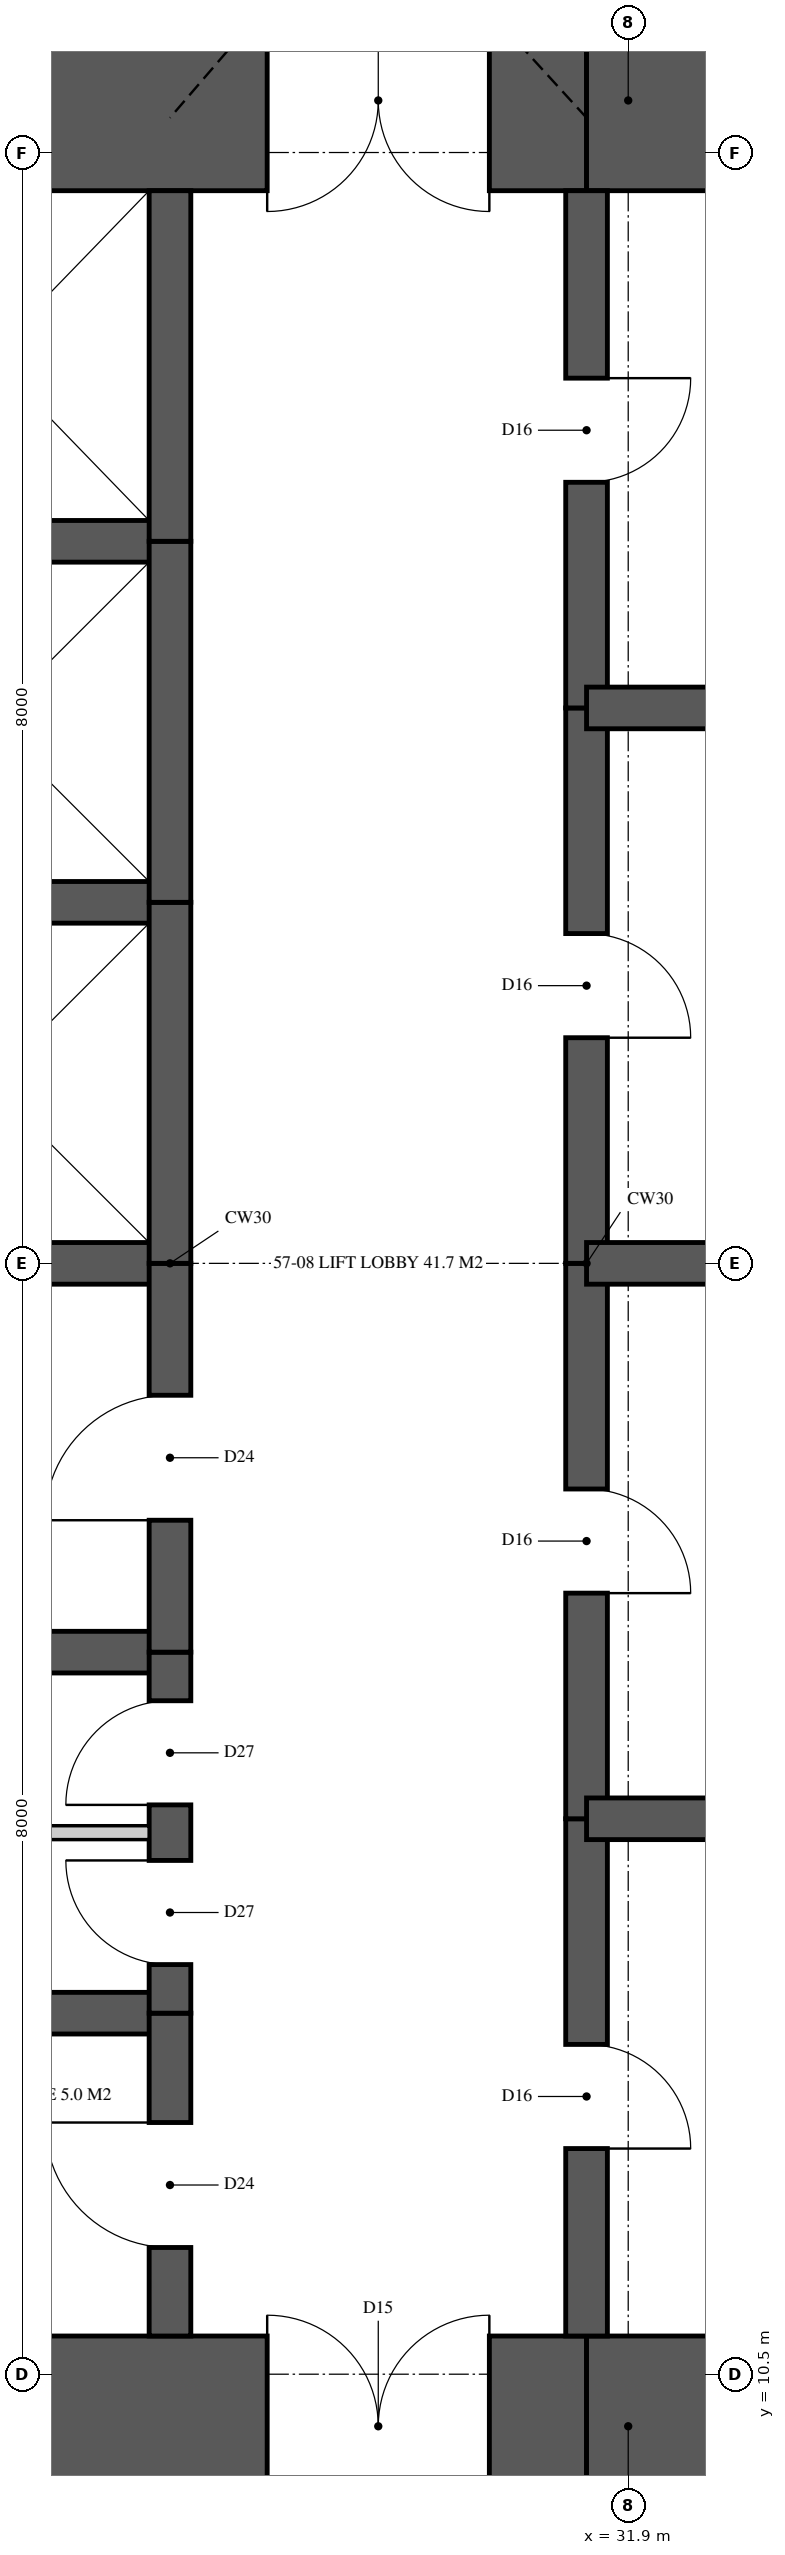
"""IFC4 building model, lengths in metres.
Left out: names, types, materials, properties, quantities, classifications, styles, units other than length and angle.
Written with IfcOpenShell. Run it as: python <this file> out.ifc"""

import sys

from ifc_helpers import new_model, si_unit, direction, frame, frame_2d, origin, place, context, subcontext, project, spatial, rectangle, extrude, element, fill, save


model = new_model("IFC4")
c1 = context("Model", 3, precision=1e-05, world=origin(), true_north=direction((0.0, 1.0)))
c2 = subcontext(c1, "Body", "Model", "MODEL_VIEW")
j1 = project(units=[si_unit("LENGTHUNIT", "METRE"), si_unit("PLANEANGLEUNIT", "RADIAN")], contexts=[c1])
p1 = place(None, origin())
s1 = spatial("IfcSite", under=j1, at=p1, CompositionType="ELEMENT")
p2 = place(p1, origin())
s2 = spatial("IfcBuilding", under=s1, at=p2, CompositionType="ELEMENT")
p3 = place(p2, frame((0.0, 0.0, 207.95)))
s3 = spatial("IfcBuildingStorey", under=s2, at=p3, CompositionType="ELEMENT", Elevation=207.95)
p4 = place(p3, frame((26.0, 10.125, 0.0), z_axis=(0.0, 0.0, 1.0), x_axis=(1.0, 0.0, 0.0)))
e1 = element("IfcWall", 1, at=p4, inside=s3, PredefinedType="SHEAR", context=c2, shape_type="SweptSolid", body=[
    extrude(rectangle(XDim=5.6, YDim=1.3, at=frame_2d((2.8, 0.0))), origin(), (0.0, 0.0, 1.0), 5.0),
])
p5 = place(p4, frame((3.3, 0.0, 0.0)))
e2 = element("IfcOpeningElement", 2, at=p5, cuts=e1, PredefinedType="OPENING", context=c2, shape_type="SweptSolid", body=[
    extrude(rectangle(XDim=1.6, YDim=2.1, at=frame_2d((0.8, 1.05))), frame((0.0, 0.66, 0.0), z_axis=(0.0, -1.0, 0.0), x_axis=(1.0, 0.0, 0.0)), (0.0, 0.0, 1.0), 1.32),
])
for number, where, z_axis, x_axis in (
    (3, (31.6, 10.125, 0.0), (0.0, 0.0, 1.0), (1.0, 0.0, 0.0)),
    (4, (35.9, 26.875, 0.0), (0.0, 0.0, 1.0), (-1.0, 0.0, 0.0)),
):
    element("IfcWall", number, at=place(p3, frame(where, z_axis=z_axis, x_axis=x_axis)), inside=s3, PredefinedType="SHEAR", context=c2, shape_type="SweptSolid", body=[
        extrude(rectangle(XDim=4.3, YDim=1.3, at=frame_2d((2.15, 0.0))), origin(), (0.0, 0.0, 1.0), 5.0),
    ])
p6 = place(p3, frame((31.6, 26.875, 0.0), z_axis=(0.0, 0.0, 1.0), x_axis=(-1.0, 0.0, 0.0)))
e5 = element("IfcWall", 5, at=p6, inside=s3, PredefinedType="SHEAR", context=c2, shape_type="SweptSolid", body=[
    extrude(rectangle(XDim=5.6, YDim=1.3, at=frame_2d((2.8, 0.0))), origin(), (0.0, 0.0, 1.0), 5.0),
])
p7 = place(p6, frame((0.7, 0.0, 0.0)))
e6 = element("IfcOpeningElement", 6, at=p7, cuts=e5, PredefinedType="OPENING", context=c2, shape_type="SweptSolid", body=[
    extrude(rectangle(XDim=1.6, YDim=2.1, at=frame_2d((0.8, 1.05))), frame((0.0, 0.66, 0.0), z_axis=(0.0, -1.0, 0.0), x_axis=(1.0, 0.0, 0.0)), (0.0, 0.0, 1.0), 1.32),
])
p8 = place(p3, frame((28.6, 10.775, 0.0), z_axis=(0.0, 0.0, 1.0), x_axis=(0.0, 1.0, 0.0)))
e7 = element("IfcWall", 7, at=p8, inside=s3, PredefinedType="SHEAR", context=c2, shape_type="SweptSolid", body=[
    extrude(rectangle(XDim=2.325, YDim=0.3, at=frame_2d((1.163, 0.0))), origin(), (0.0, 0.0, 1.0), 5.0),
])
p9 = place(p8, frame((0.637, 0.0, 0.0)))
e8 = element("IfcOpeningElement", 8, at=p9, cuts=e7, PredefinedType="OPENING", context=c2, shape_type="SweptSolid", body=[
    extrude(rectangle(XDim=0.9, YDim=2.1, at=frame_2d((0.45, 1.05))), frame((0.0, 0.16, 0.0), z_axis=(0.0, -1.0, 0.0), x_axis=(1.0, 0.0, 0.0)), (0.0, 0.0, 1.0), 0.32),
])
p10 = place(p3, frame((28.6, 13.1, 0.0), z_axis=(0.0, 0.0, 1.0), x_axis=(0.0, 1.0, 0.0)))
e9 = element("IfcWall", 9, at=p10, inside=s3, PredefinedType="SHEAR", context=c2, shape_type="SweptSolid", body=[
    extrude(rectangle(XDim=2.6, YDim=0.3, at=frame_2d((1.3, 0.0))), origin(), (0.0, 0.0, 1.0), 5.0),
])
p11 = place(p10, frame((0.35, 0.0, 0.0)))
e10 = element("IfcOpeningElement", 10, at=p11, cuts=e9, PredefinedType="OPENING", context=c2, shape_type="SweptSolid", body=[
    extrude(rectangle(XDim=0.75, YDim=2.1, at=frame_2d((0.375, 1.05))), frame((0.0, 0.16, 0.0), z_axis=(0.0, -1.0, 0.0), x_axis=(1.0, 0.0, 0.0)), (0.0, 0.0, 1.0), 0.32),
])
p12 = place(p10, frame((1.5, 0.0, 0.0)))
e11 = element("IfcOpeningElement", 11, at=p12, cuts=e9, PredefinedType="OPENING", context=c2, shape_type="SweptSolid", body=[
    extrude(rectangle(XDim=0.75, YDim=2.1, at=frame_2d((0.375, 1.05))), frame((0.0, 0.16, 0.0), z_axis=(0.0, -1.0, 0.0), x_axis=(1.0, 0.0, 0.0)), (0.0, 0.0, 1.0), 0.32),
])
p13 = place(p3, frame((28.6, 15.7, 0.0), z_axis=(0.0, 0.0, 1.0), x_axis=(0.0, 1.0, 0.0)))
e12 = element("IfcWall", 12, at=p13, inside=s3, PredefinedType="SHEAR", context=c2, shape_type="SweptSolid", body=[
    extrude(rectangle(XDim=2.8, YDim=0.3, at=frame_2d((1.4, 0.0))), origin(), (0.0, 0.0, 1.0), 5.0),
])
p14 = place(p13, frame((0.95, 0.0, 0.0)))
e13 = element("IfcOpeningElement", 13, at=p14, cuts=e12, PredefinedType="OPENING", context=c2, shape_type="SweptSolid", body=[
    extrude(rectangle(XDim=0.9, YDim=2.1, at=frame_2d((0.45, 1.05))), frame((0.0, 0.16, 0.0), z_axis=(0.0, -1.0, 0.0), x_axis=(1.0, 0.0, 0.0)), (0.0, 0.0, 1.0), 0.32),
])
p15 = place(p3, frame((28.6, 18.5, 0.0), z_axis=(0.0, 0.0, 1.0), x_axis=(0.0, 1.0, 0.0)))
e14 = element("IfcWall", 14, at=p15, inside=s3, PredefinedType="SHEAR", context=c2, shape_type="SweptSolid", body=[
    extrude(rectangle(XDim=2.6, YDim=0.3, at=frame_2d((1.3, 0.0))), origin(), (0.0, 0.0, 1.0), 5.0),
])
p16 = place(p3, frame((28.6, 21.1, 0.0), z_axis=(0.0, 0.0, 1.0), x_axis=(0.0, 1.0, 0.0)))
e15 = element("IfcWall", 15, at=p16, inside=s3, PredefinedType="SHEAR", context=c2, shape_type="SweptSolid", body=[
    extrude(rectangle(XDim=2.6, YDim=0.3, at=frame_2d((1.3, 0.0))), origin(), (0.0, 0.0, 1.0), 5.0),
])
p17 = place(p3, frame((28.6, 23.7, 0.0), z_axis=(0.0, 0.0, 1.0), x_axis=(0.0, 1.0, 0.0)))
e16 = element("IfcWall", 16, at=p17, inside=s3, PredefinedType="SHEAR", context=c2, shape_type="SweptSolid", body=[
    extrude(rectangle(XDim=2.525, YDim=0.3, at=frame_2d((1.263, 0.0))), origin(), (0.0, 0.0, 1.0), 5.0),
])
p18 = place(p3, frame((31.6, 10.775, 0.0), z_axis=(0.0, 0.0, 1.0), x_axis=(0.0, 1.0, 0.0)))
e17 = element("IfcWall", 17, at=p18, inside=s3, PredefinedType="SHEAR", context=c2, shape_type="SweptSolid", body=[
    extrude(rectangle(XDim=3.725, YDim=0.3, at=frame_2d((1.863, 0.0))), origin(), (0.0, 0.0, 1.0), 5.0),
])
p19 = place(p18, frame((1.35, 0.0, 0.0)))
e18 = element("IfcOpeningElement", 18, at=p19, cuts=e17, PredefinedType="OPENING", context=c2, shape_type="SweptSolid", body=[
    extrude(rectangle(XDim=0.75, YDim=2.1, at=frame_2d((0.375, 1.05))), frame((0.0, 0.16, 0.0), z_axis=(0.0, -1.0, 0.0), x_axis=(1.0, 0.0, 0.0)), (0.0, 0.0, 1.0), 0.32),
])
p20 = place(p3, frame((31.6, 14.5, 0.0), z_axis=(0.0, 0.0, 1.0), x_axis=(0.0, 1.0, 0.0)))
e19 = element("IfcWall", 19, at=p20, inside=s3, PredefinedType="SHEAR", context=c2, shape_type="SweptSolid", body=[
    extrude(rectangle(XDim=4.0, YDim=0.3, at=frame_2d((2.0, 0.0))), origin(), (0.0, 0.0, 1.0), 5.0),
])
p21 = place(p20, frame((1.625, 0.0, 0.0)))
e20 = element("IfcOpeningElement", 20, at=p21, cuts=e19, PredefinedType="OPENING", context=c2, shape_type="SweptSolid", body=[
    extrude(rectangle(XDim=0.75, YDim=2.1, at=frame_2d((0.375, 1.05))), frame((0.0, 0.16, 0.0), z_axis=(0.0, -1.0, 0.0), x_axis=(1.0, 0.0, 0.0)), (0.0, 0.0, 1.0), 0.32),
])
p22 = place(p3, frame((31.6, 18.5, 0.0), z_axis=(0.0, 0.0, 1.0), x_axis=(0.0, 1.0, 0.0)))
e21 = element("IfcWall", 21, at=p22, inside=s3, PredefinedType="SHEAR", context=c2, shape_type="SweptSolid", body=[
    extrude(rectangle(XDim=4.0, YDim=0.3, at=frame_2d((2.0, 0.0))), origin(), (0.0, 0.0, 1.0), 5.0),
])
p23 = place(p22, frame((1.625, 0.0, 0.0)))
e22 = element("IfcOpeningElement", 22, at=p23, cuts=e21, PredefinedType="OPENING", context=c2, shape_type="SweptSolid", body=[
    extrude(rectangle(XDim=0.75, YDim=2.1, at=frame_2d((0.375, 1.05))), frame((0.0, 0.16, 0.0), z_axis=(0.0, -1.0, 0.0), x_axis=(1.0, 0.0, 0.0)), (0.0, 0.0, 1.0), 0.32),
])
p24 = place(p3, frame((31.6, 22.5, 0.0), z_axis=(0.0, 0.0, 1.0), x_axis=(0.0, 1.0, 0.0)))
e23 = element("IfcWall", 23, at=p24, inside=s3, PredefinedType="SHEAR", context=c2, shape_type="SweptSolid", body=[
    extrude(rectangle(XDim=3.725, YDim=0.3, at=frame_2d((1.863, 0.0))), origin(), (0.0, 0.0, 1.0), 5.0),
])
p25 = place(p24, frame((1.625, 0.0, 0.0)))
e24 = element("IfcOpeningElement", 24, at=p25, cuts=e23, PredefinedType="OPENING", context=c2, shape_type="SweptSolid", body=[
    extrude(rectangle(XDim=0.75, YDim=2.1, at=frame_2d((0.375, 1.05))), frame((0.0, 0.16, 0.0), z_axis=(0.0, -1.0, 0.0), x_axis=(1.0, 0.0, 0.0)), (0.0, 0.0, 1.0), 0.32),
])
for number, where, z_axis, x_axis in (
    (25, (26.0, 13.1, 0.0), (0.0, 0.0, 1.0), (1.0, 0.0, 0.0)),
    (26, (26.0, 15.7, 0.0), (0.0, 0.0, 1.0), (1.0, 0.0, 0.0)),
    (27, (26.0, 18.5, 0.0), (0.0, 0.0, 1.0), (1.0, 0.0, 0.0)),
    (28, (26.0, 21.1, 0.0), (0.0, 0.0, 1.0), (1.0, 0.0, 0.0)),
    (29, (26.0, 23.7, 0.0), (0.0, 0.0, 1.0), (1.0, 0.0, 0.0)),
):
    element("IfcWall", number, at=place(p3, frame(where, z_axis=z_axis, x_axis=x_axis)), inside=s3, PredefinedType="SHEAR", context=c2, shape_type="SweptSolid", body=[
        extrude(rectangle(XDim=2.6, YDim=0.3, at=frame_2d((1.3, 0.0))), origin(), (0.0, 0.0, 1.0), 5.0),
    ])
for number, where, z_axis, x_axis in (
    (30, (31.6, 14.5, 0.0), (0.0, 0.0, 1.0), (1.0, 0.0, 0.0)),
    (31, (31.6, 18.5, 0.0), (0.0, 0.0, 1.0), (1.0, 0.0, 0.0)),
    (32, (31.6, 22.5, 0.0), (0.0, 0.0, 1.0), (1.0, 0.0, 0.0)),
):
    element("IfcWall", number, at=place(p3, frame(where, z_axis=z_axis, x_axis=x_axis)), inside=s3, PredefinedType="SHEAR", context=c2, shape_type="SweptSolid", body=[
        extrude(rectangle(XDim=4.3, YDim=0.3, at=frame_2d((2.15, 0.0))), origin(), (0.0, 0.0, 1.0), 5.0),
    ])
p26 = place(p3, frame((26.15, 14.4, 0.0), z_axis=(0.0, 0.0, 1.0), x_axis=(1.0, 0.0, 0.0)))
e33 = element("IfcWall", 33, at=p26, inside=s3, PredefinedType="PARTITIONING", context=c2, shape_type="SweptSolid", body=[
    extrude(rectangle(XDim=2.3, YDim=0.1, at=frame_2d((1.15, 0.0))), origin(), (0.0, 0.0, 1.0), 4.72),
])
p27 = place(p9, origin())
e34 = element("IfcDoor", 34, at=p27, inside=s3, OperationType="SINGLE_SWING_RIGHT", PredefinedType="DOOR", context=c2, shape_type="SweptSolid", body=[
    extrude(rectangle(XDim=0.9, YDim=2.1, at=frame_2d((0.45, 1.05))), frame((0.0, 0.025, 0.0), z_axis=(0.0, -1.0, 0.0), x_axis=(1.0, 0.0, 0.0)), (0.0, 0.0, 1.0), 0.05),
])
fill(e8, e34)
p28 = place(p11, origin())
e35 = element("IfcDoor", 35, at=p28, inside=s3, OperationType="SINGLE_SWING_RIGHT", PredefinedType="DOOR", context=c2, shape_type="SweptSolid", body=[
    extrude(rectangle(XDim=0.75, YDim=2.1, at=frame_2d((0.375, 1.05))), frame((0.0, 0.025, 0.0), z_axis=(0.0, -1.0, 0.0), x_axis=(1.0, 0.0, 0.0)), (0.0, 0.0, 1.0), 0.05),
])
fill(e10, e35)
p29 = place(p12, origin())
e36 = element("IfcDoor", 36, at=p29, inside=s3, OperationType="SINGLE_SWING_LEFT", PredefinedType="DOOR", context=c2, shape_type="SweptSolid", body=[
    extrude(rectangle(XDim=0.75, YDim=2.1, at=frame_2d((0.375, 1.05))), frame((0.0, 0.025, 0.0), z_axis=(0.0, -1.0, 0.0), x_axis=(1.0, 0.0, 0.0)), (0.0, 0.0, 1.0), 0.05),
])
fill(e11, e36)
p30 = place(p14, origin())
e37 = element("IfcDoor", 37, at=p30, inside=s3, OperationType="SINGLE_SWING_LEFT", PredefinedType="DOOR", context=c2, shape_type="SweptSolid", body=[
    extrude(rectangle(XDim=0.9, YDim=2.1, at=frame_2d((0.45, 1.05))), frame((0.0, 0.025, 0.0), z_axis=(0.0, -1.0, 0.0), x_axis=(1.0, 0.0, 0.0)), (0.0, 0.0, 1.0), 0.05),
])
fill(e13, e37)
p31 = place(p5, origin())
e38 = element("IfcDoor", 38, at=p31, inside=s3, OperationType="DOUBLE_DOOR_SINGLE_SWING", PredefinedType="DOOR", context=c2, shape_type="SweptSolid", body=[
    extrude(rectangle(XDim=1.6, YDim=2.1, at=frame_2d((0.8, 1.05))), frame((0.0, 0.025, 0.0), z_axis=(0.0, -1.0, 0.0), x_axis=(1.0, 0.0, 0.0)), (0.0, 0.0, 1.0), 0.05),
])
fill(e2, e38)
p32 = place(p7, origin())
e39 = element("IfcDoor", 39, at=p32, inside=s3, OperationType="DOUBLE_DOOR_SINGLE_SWING", PredefinedType="DOOR", context=c2, shape_type="SweptSolid", body=[
    extrude(rectangle(XDim=1.6, YDim=2.1, at=frame_2d((0.8, 1.05))), frame((0.0, 0.025, 0.0), z_axis=(0.0, -1.0, 0.0), x_axis=(1.0, 0.0, 0.0)), (0.0, 0.0, 1.0), 0.05),
])
fill(e6, e39)
p33 = place(p19, frame((0.75, 0.0, 0.0), z_axis=(0.0, 0.0, 1.0), x_axis=(-1.0, 0.0, 0.0)))
e40 = element("IfcDoor", 40, at=p33, inside=s3, OperationType="SINGLE_SWING_RIGHT", PredefinedType="DOOR", context=c2, shape_type="SweptSolid", body=[
    extrude(rectangle(XDim=0.75, YDim=2.1, at=frame_2d((0.375, 1.05))), frame((0.0, 0.025, 0.0), z_axis=(0.0, -1.0, 0.0), x_axis=(1.0, 0.0, 0.0)), (0.0, 0.0, 1.0), 0.05),
])
fill(e18, e40)
p34 = place(p21, frame((0.75, 0.0, 0.0), z_axis=(0.0, 0.0, 1.0), x_axis=(-1.0, 0.0, 0.0)))
e41 = element("IfcDoor", 41, at=p34, inside=s3, OperationType="SINGLE_SWING_RIGHT", PredefinedType="DOOR", context=c2, shape_type="SweptSolid", body=[
    extrude(rectangle(XDim=0.75, YDim=2.1, at=frame_2d((0.375, 1.05))), frame((0.0, 0.025, 0.0), z_axis=(0.0, -1.0, 0.0), x_axis=(1.0, 0.0, 0.0)), (0.0, 0.0, 1.0), 0.05),
])
fill(e20, e41)
p35 = place(p23, frame((0.75, 0.0, 0.0), z_axis=(0.0, 0.0, 1.0), x_axis=(-1.0, 0.0, 0.0)))
e42 = element("IfcDoor", 42, at=p35, inside=s3, OperationType="SINGLE_SWING_RIGHT", PredefinedType="DOOR", context=c2, shape_type="SweptSolid", body=[
    extrude(rectangle(XDim=0.75, YDim=2.1, at=frame_2d((0.375, 1.05))), frame((0.0, 0.025, 0.0), z_axis=(0.0, -1.0, 0.0), x_axis=(1.0, 0.0, 0.0)), (0.0, 0.0, 1.0), 0.05),
])
fill(e22, e42)
p36 = place(p25, frame((0.75, 0.0, 0.0), z_axis=(0.0, 0.0, 1.0), x_axis=(-1.0, 0.0, 0.0)))
e43 = element("IfcDoor", 43, at=p36, inside=s3, OperationType="SINGLE_SWING_LEFT", PredefinedType="DOOR", context=c2, shape_type="SweptSolid", body=[
    extrude(rectangle(XDim=0.75, YDim=2.1, at=frame_2d((0.375, 1.05))), frame((0.0, 0.025, 0.0), z_axis=(0.0, -1.0, 0.0), x_axis=(1.0, 0.0, 0.0)), (0.0, 0.0, 1.0), 0.05),
])
fill(e24, e43)
save(model, sys.argv[1])
